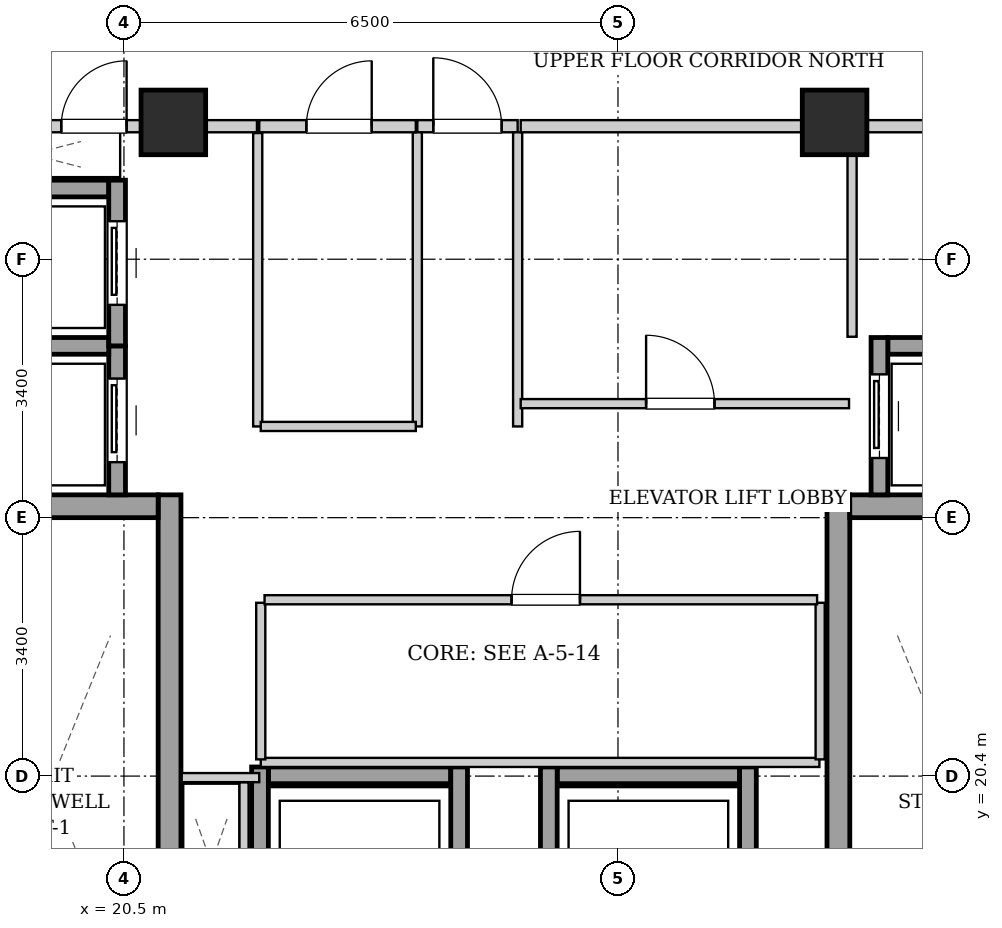
"""IFC4 building model, lengths in metres.
Left out: names, types, materials, properties, quantities, classifications, styles, units other than length and angle.
Written with IfcOpenShell. Run it as: python <this file> out.ifc"""

import sys

from ifc_helpers import new_model, si_unit, direction, frame, frame_2d, origin, origin_2d, place, context, subcontext, project, spatial, rectangle, extrude, element, fill, save


model = new_model("IFC4")
c1 = context("Model", 3, precision=1e-05, world=origin(), true_north=direction((0.0, 1.0)))
c2 = subcontext(c1, "Body", "Model", "MODEL_VIEW")
j1 = project(units=[si_unit("LENGTHUNIT", "METRE"), si_unit("PLANEANGLEUNIT", "RADIAN")], contexts=[c1])
p1 = place(None, origin())
s1 = spatial("IfcSite", under=j1, at=p1, CompositionType="ELEMENT")
p2 = place(p1, origin())
s2 = spatial("IfcBuilding", under=s1, at=p2, CompositionType="ELEMENT")
p3 = place(p2, frame((0.0, 0.0, 204.1)))
s3 = spatial("IfcBuildingStorey", under=s2, at=p3, CompositionType="ELEMENT", Elevation=204.1)
for number, where, z_axis, x_axis in (
    (1, (21.15, 29.0, 0.0), (0.0, 0.0, 1.0), (1.0, 0.0, 0.0)),
    (2, (29.85, 29.0, 0.0), (0.0, 0.0, 1.0), (1.0, 0.0, 0.0)),
):
    element("IfcColumn", number, at=place(p3, frame(where, z_axis=z_axis, x_axis=x_axis)), inside=s3, PredefinedType="COLUMN", context=c2, shape_type="SweptSolid", body=[
        extrude(rectangle(XDim=0.85, YDim=0.85, at=origin_2d()), origin(), (0.0, 0.0, 1.0), 3.3),
    ])
p4 = place(p3, frame((21.1, 15.1, 0.0), z_axis=(0.0, 0.0, 1.0), x_axis=(0.0, 1.0, 0.0)))
e3 = element("IfcWall", 3, at=p4, inside=s3, PredefinedType="SHEAR", context=c2, shape_type="SweptSolid", body=[
    extrude(rectangle(XDim=9.0, YDim=0.3, at=frame_2d((4.5, 0.0))), origin(), (0.0, 0.0, 1.0), 3.04),
])
p5 = place(p3, frame((18.1, 23.95, 0.0), z_axis=(0.0, 0.0, 1.0), x_axis=(1.0, 0.0, 0.0)))
e4 = element("IfcWall", 4, at=p5, inside=s3, PredefinedType="SHEAR", context=c2, shape_type="SweptSolid", body=[
    extrude(rectangle(XDim=2.85, YDim=0.3, at=frame_2d((1.425, 0.0))), origin(), (0.0, 0.0, 1.0), 3.04),
])
p6 = place(p3, frame((29.9, 15.1, 0.0), z_axis=(0.0, 0.0, 1.0), x_axis=(0.0, 1.0, 0.0)))
e5 = element("IfcWall", 5, at=p6, inside=s3, PredefinedType="SHEAR", context=c2, shape_type="SweptSolid", body=[
    extrude(rectangle(XDim=9.0, YDim=0.3, at=frame_2d((4.5, 0.0))), origin(), (0.0, 0.0, 1.0), 3.04),
])
p7 = place(p3, frame((30.05, 23.95, 0.0), z_axis=(0.0, 0.0, 1.0), x_axis=(1.0, 0.0, 0.0)))
e6 = element("IfcWall", 6, at=p7, inside=s3, PredefinedType="SHEAR", context=c2, shape_type="SweptSolid", body=[
    extrude(rectangle(XDim=2.85, YDim=0.3, at=frame_2d((1.425, 0.0))), origin(), (0.0, 0.0, 1.0), 3.04),
])
p8 = place(p3, frame((20.41, 24.1, 0.0), z_axis=(0.0, 0.0, 1.0), x_axis=(0.0, 1.0, 0.0)))
e7 = element("IfcWall", 7, at=p8, inside=s3, PredefinedType="SHEAR", context=c2, shape_type="SweptSolid", body=[
    extrude(rectangle(XDim=1.96, YDim=0.22, at=frame_2d((0.98, 0.0))), origin(), (0.0, 0.0, 1.0), 3.04),
])
p9 = place(p8, frame((0.43, 0.0, 0.0)))
e8 = element("IfcOpeningElement", 8, at=p9, cuts=e7, PredefinedType="OPENING", context=c2, shape_type="SweptSolid", body=[
    extrude(rectangle(XDim=1.1, YDim=2.15, at=frame_2d((0.55, 1.075))), frame((0.0, 0.12, 0.0), z_axis=(0.0, -1.0, 0.0), x_axis=(1.0, 0.0, 0.0)), (0.0, 0.0, 1.0), 0.24),
])
for number, where, z_axis, x_axis in (
    (9, (18.4, 26.06, 0.0), (0.0, 0.0, 1.0), (1.0, 0.0, 0.0)),
    (10, (18.4, 28.13, 0.0), (0.0, 0.0, 1.0), (1.0, 0.0, 0.0)),
):
    element("IfcWall", number, at=place(p3, frame(where, z_axis=z_axis, x_axis=x_axis)), inside=s3, PredefinedType="SHEAR", context=c2, shape_type="SweptSolid", body=[
        extrude(rectangle(XDim=1.9, YDim=0.22, at=frame_2d((0.95, 0.0))), origin(), (0.0, 0.0, 1.0), 3.04),
    ])
p10 = place(p3, frame((20.41, 26.06, 0.0), z_axis=(0.0, 0.0, 1.0), x_axis=(0.0, 1.0, 0.0)))
e11 = element("IfcWall", 11, at=p10, inside=s3, PredefinedType="SHEAR", context=c2, shape_type="SweptSolid", body=[
    extrude(rectangle(XDim=2.18, YDim=0.22, at=frame_2d((1.09, 0.0))), origin(), (0.0, 0.0, 1.0), 3.04),
])
p11 = place(p10, frame((0.54, 0.0, 0.0)))
e12 = element("IfcOpeningElement", 12, at=p11, cuts=e11, PredefinedType="OPENING", context=c2, shape_type="SweptSolid", body=[
    extrude(rectangle(XDim=1.1, YDim=2.15, at=frame_2d((0.55, 1.075))), frame((0.0, 0.12, 0.0), z_axis=(0.0, -1.0, 0.0), x_axis=(1.0, 0.0, 0.0)), (0.0, 0.0, 1.0), 0.24),
])
p12 = place(p3, frame((30.55, 26.06, 0.0), z_axis=(0.0, 0.0, 1.0), x_axis=(1.0, 0.0, 0.0)))
e13 = element("IfcWall", 13, at=p12, inside=s3, PredefinedType="SHEAR", context=c2, shape_type="SweptSolid", body=[
    extrude(rectangle(XDim=1.9, YDim=0.22, at=frame_2d((0.95, 0.0))), origin(), (0.0, 0.0, 1.0), 3.04),
])
p13 = place(p3, frame((30.44, 24.1, 0.0), z_axis=(0.0, 0.0, 1.0), x_axis=(0.0, 1.0, 0.0)))
e14 = element("IfcWall", 14, at=p13, inside=s3, PredefinedType="SHEAR", context=c2, shape_type="SweptSolid", body=[
    extrude(rectangle(XDim=2.07, YDim=0.22, at=frame_2d((1.035, 0.0))), origin(), (0.0, 0.0, 1.0), 3.04),
])
p14 = place(p13, frame((0.485, 0.0, 0.0)))
e15 = element("IfcOpeningElement", 15, at=p14, cuts=e14, PredefinedType="OPENING", context=c2, shape_type="SweptSolid", body=[
    extrude(rectangle(XDim=1.1, YDim=2.15, at=frame_2d((0.55, 1.075))), frame((0.0, 0.12, 0.0), z_axis=(0.0, -1.0, 0.0), x_axis=(1.0, 0.0, 0.0)), (0.0, 0.0, 1.0), 0.24),
])
p15 = place(p3, frame((22.4, 20.41, 0.0), z_axis=(0.0, 0.0, 1.0), x_axis=(1.0, 0.0, 0.0)))
e16 = element("IfcWall", 16, at=p15, inside=s3, PredefinedType="SHEAR", context=c2, shape_type="SweptSolid", body=[
    extrude(rectangle(XDim=2.4, YDim=0.22, at=frame_2d((1.2, 0.0))), origin(), (0.0, 0.0, 1.0), 3.04),
])
for number, where, z_axis, x_axis in (
    (17, (22.29, 17.98, 0.0), (0.0, 0.0, 1.0), (0.0, 1.0, 0.0)),
    (18, (24.91, 17.98, 0.0), (0.0, 0.0, 1.0), (0.0, 1.0, 0.0)),
):
    element("IfcWall", number, at=place(p3, frame(where, z_axis=z_axis, x_axis=x_axis)), inside=s3, PredefinedType="SHEAR", context=c2, shape_type="SweptSolid", body=[
        extrude(rectangle(XDim=2.54, YDim=0.22, at=frame_2d((1.27, 0.0))), origin(), (0.0, 0.0, 1.0), 3.04),
    ])
p16 = place(p3, frame((26.2, 20.41, 0.0), z_axis=(0.0, 0.0, 1.0), x_axis=(1.0, 0.0, 0.0)))
e19 = element("IfcWall", 19, at=p16, inside=s3, PredefinedType="SHEAR", context=c2, shape_type="SweptSolid", body=[
    extrude(rectangle(XDim=2.4, YDim=0.22, at=frame_2d((1.2, 0.0))), origin(), (0.0, 0.0, 1.0), 3.04),
])
for number, where, z_axis, x_axis in (
    (20, (26.09, 17.98, 0.0), (0.0, 0.0, 1.0), (0.0, 1.0, 0.0)),
    (21, (28.71, 17.98, 0.0), (0.0, 0.0, 1.0), (0.0, 1.0, 0.0)),
):
    element("IfcWall", number, at=place(p3, frame(where, z_axis=z_axis, x_axis=x_axis)), inside=s3, PredefinedType="SHEAR", context=c2, shape_type="SweptSolid", body=[
        extrude(rectangle(XDim=2.54, YDim=0.22, at=frame_2d((1.27, 0.0))), origin(), (0.0, 0.0, 1.0), 3.04),
    ])
p17 = place(p3, frame((24.36, 28.95, 0.0), z_axis=(0.0, 0.0, 1.0), x_axis=(1.0, 0.0, 0.0)))
e22 = element("IfcWall", 22, at=p17, inside=s3, PredefinedType="PARTITIONING", context=c2, shape_type="SweptSolid", body=[
    extrude(rectangle(XDim=1.32, YDim=0.16, at=frame_2d((0.66, 0.0))), origin(), (0.0, 0.0, 1.0), 2.556),
])
p18 = place(p17, frame((0.21, 0.0, 0.0)))
e23 = element("IfcOpeningElement", 23, at=p18, cuts=e22, PredefinedType="OPENING", context=c2, shape_type="SweptSolid", body=[
    extrude(rectangle(XDim=0.9, YDim=2.05, at=frame_2d((0.45, 1.025))), frame((0.0, 0.09, 0.0), z_axis=(0.0, -1.0, 0.0), x_axis=(1.0, 0.0, 0.0)), (0.0, 0.0, 1.0), 0.18),
])
p19 = place(p3, frame((17.96, 28.95, 0.0), z_axis=(0.0, 0.0, 1.0), x_axis=(1.0, 0.0, 0.0)))
e24 = element("IfcWall", 24, at=p19, inside=s3, PredefinedType="PARTITIONING", context=c2, shape_type="SweptSolid", body=[
    extrude(rectangle(XDim=4.29, YDim=0.16, at=frame_2d((2.145, 0.0))), origin(), (0.0, 0.0, 1.0), 2.556),
])
p20 = place(p19, frame((1.715, 0.0, 0.0)))
e25 = element("IfcOpeningElement", 25, at=p20, cuts=e24, PredefinedType="OPENING", context=c2, shape_type="SweptSolid", body=[
    extrude(rectangle(XDim=0.86, YDim=2.05, at=frame_2d((0.43, 1.025))), frame((0.0, 0.09, 0.0), z_axis=(0.0, -1.0, 0.0), x_axis=(1.0, 0.0, 0.0)), (0.0, 0.0, 1.0), 0.18),
])
p21 = place(p3, frame((22.08, 18.2, 0.0), z_axis=(0.0, 0.0, 1.0), x_axis=(0.0, 1.0, 0.0)))
e26 = element("IfcWall", 26, at=p21, inside=s3, PredefinedType="PARTITIONING", context=c2, shape_type="SweptSolid", body=[
    extrude(rectangle(XDim=2.12, YDim=0.12, at=frame_2d((1.06, 0.0))), origin(), (0.0, 0.0, 1.0), 3.04),
])
p22 = place(p3, frame((22.28, 20.38, 0.0), z_axis=(0.0, 0.0, 1.0), x_axis=(-1.0, 0.0, 0.0)))
e27 = element("IfcWall", 27, at=p22, inside=s3, PredefinedType="PARTITIONING", context=c2, shape_type="SweptSolid", body=[
    extrude(rectangle(XDim=1.02, YDim=0.12, at=frame_2d((0.51, 0.0))), origin(), (0.0, 0.0, 1.0), 3.04),
])
for number, where, z_axis, x_axis in (
    (28, (24.36, 25.0, 0.0), (0.0, 0.0, 1.0), (0.0, 1.0, 0.0)),
    (29, (25.68, 25.0, 0.0), (0.0, 0.0, 1.0), (0.0, 1.0, 0.0)),
):
    element("IfcWall", number, at=place(p3, frame(where, z_axis=z_axis, x_axis=x_axis)), inside=s3, PredefinedType="PARTITIONING", context=c2, shape_type="SweptSolid", body=[
        extrude(rectangle(XDim=3.87, YDim=0.12, at=frame_2d((1.935, 0.0))), origin(), (0.0, 0.0, 1.0), 3.04),
    ])
p23 = place(p3, frame((30.08, 26.18, 0.0), z_axis=(0.0, 0.0, 1.0), x_axis=(0.0, 1.0, 0.0)))
e30 = element("IfcWall", 30, at=p23, inside=s3, PredefinedType="PARTITIONING", context=c2, shape_type="SweptSolid", body=[
    extrude(rectangle(XDim=2.68, YDim=0.12, at=frame_2d((1.34, 0.0))), origin(), (0.0, 0.0, 1.0), 3.04),
])
p24 = place(p3, frame((30.08, 28.95, 0.0), z_axis=(0.0, 0.0, 1.0), x_axis=(1.0, 0.0, 0.0)))
e31 = element("IfcWall", 31, at=p24, inside=s3, PredefinedType="PARTITIONING", context=c2, shape_type="SweptSolid", body=[
    extrude(rectangle(XDim=2.96, YDim=0.16, at=frame_2d((1.48, 0.0))), origin(), (0.0, 0.0, 1.0), 3.04),
])
p25 = place(p24, frame((1.045, 0.0, 0.0)))
e32 = element("IfcOpeningElement", 32, at=p25, cuts=e31, PredefinedType="OPENING", context=c2, shape_type="SweptSolid", body=[
    extrude(rectangle(XDim=0.86, YDim=2.05, at=frame_2d((0.43, 1.025))), frame((0.0, 0.09, 0.0), z_axis=(0.0, -1.0, 0.0), x_axis=(1.0, 0.0, 0.0)), (0.0, 0.0, 1.0), 0.18),
])
p26 = place(p3, frame((22.26, 25.0, 0.0), z_axis=(0.0, 0.0, 1.0), x_axis=(0.0, 1.0, 0.0)))
e33 = element("IfcWall", 33, at=p26, inside=s3, PredefinedType="PARTITIONING", context=c2, shape_type="SweptSolid", body=[
    extrude(rectangle(XDim=3.86, YDim=0.12, at=frame_2d((1.93, 0.0))), origin(), (0.0, 0.0, 1.0), 3.04),
])
p27 = place(p3, frame((22.3, 25.0, 0.0), z_axis=(0.0, 0.0, 1.0), x_axis=(1.0, 0.0, 0.0)))
e34 = element("IfcWall", 34, at=p27, inside=s3, PredefinedType="PARTITIONING", context=c2, shape_type="SweptSolid", body=[
    extrude(rectangle(XDim=2.04, YDim=0.12, at=frame_2d((1.02, 0.0))), origin(), (0.0, 0.0, 1.0), 3.04),
])
p28 = place(p3, frame((22.28, 28.95, 0.0), z_axis=(0.0, 0.0, 1.0), x_axis=(1.0, 0.0, 0.0)))
e35 = element("IfcWall", 35, at=p28, inside=s3, PredefinedType="PARTITIONING", context=c2, shape_type="SweptSolid", body=[
    extrude(rectangle(XDim=2.06, YDim=0.16, at=frame_2d((1.03, 0.0))), origin(), (0.0, 0.0, 1.0), 2.556),
])
p29 = place(p28, frame((0.62, 0.0, 0.0)))
e36 = element("IfcOpeningElement", 36, at=p29, cuts=e35, PredefinedType="OPENING", context=c2, shape_type="SweptSolid", body=[
    extrude(rectangle(XDim=0.86, YDim=2.05, at=frame_2d((0.43, 1.025))), frame((0.0, 0.09, 0.0), z_axis=(0.0, -1.0, 0.0), x_axis=(1.0, 0.0, 0.0)), (0.0, 0.0, 1.0), 0.18),
])
p30 = place(p3, frame((25.72, 28.95, 0.0), z_axis=(0.0, 0.0, 1.0), x_axis=(1.0, 0.0, 0.0)))
e37 = element("IfcWall", 37, at=p30, inside=s3, PredefinedType="PARTITIONING", context=c2, shape_type="SweptSolid", body=[
    extrude(rectangle(XDim=4.32, YDim=0.16, at=frame_2d((2.16, 0.0))), origin(), (0.0, 0.0, 1.0), 2.556),
])
p31 = place(p3, frame((25.72, 25.3, 0.0), z_axis=(0.0, 0.0, 1.0), x_axis=(1.0, 0.0, 0.0)))
e38 = element("IfcWall", 38, at=p31, inside=s3, PredefinedType="PARTITIONING", context=c2, shape_type="SweptSolid", body=[
    extrude(rectangle(XDim=4.32, YDim=0.12, at=frame_2d((2.16, 0.0))), origin(), (0.0, 0.0, 1.0), 3.04),
])
p32 = place(p31, frame((1.65, 0.0, 0.0)))
e39 = element("IfcOpeningElement", 39, at=p32, cuts=e38, PredefinedType="OPENING", context=c2, shape_type="SweptSolid", body=[
    extrude(rectangle(XDim=0.9, YDim=2.05, at=frame_2d((0.45, 1.025))), frame((0.0, 0.07, 0.0), z_axis=(0.0, -1.0, 0.0), x_axis=(1.0, 0.0, 0.0)), (0.0, 0.0, 1.0), 0.14),
])
p33 = place(p3, frame((22.3, 20.58, 0.0), z_axis=(0.0, 0.0, 1.0), x_axis=(1.0, 0.0, 0.0)))
e40 = element("IfcWall", 40, at=p33, inside=s3, PredefinedType="PARTITIONING", context=c2, shape_type="SweptSolid", body=[
    extrude(rectangle(XDim=7.35, YDim=0.12, at=frame_2d((3.675, 0.0))), origin(), (0.0, 0.0, 1.0), 3.04),
])
for number, where, z_axis, x_axis in (
    (41, (22.3, 20.62, 0.0), (0.0, 0.0, 1.0), (0.0, 1.0, 0.0)),
    (42, (29.66, 20.62, 0.0), (0.0, 0.0, 1.0), (0.0, 1.0, 0.0)),
):
    element("IfcWall", number, at=place(p3, frame(where, z_axis=z_axis, x_axis=x_axis)), inside=s3, PredefinedType="PARTITIONING", context=c2, shape_type="SweptSolid", body=[
        extrude(rectangle(XDim=2.06, YDim=0.12, at=frame_2d((1.03, 0.0))), origin(), (0.0, 0.0, 1.0), 3.04),
    ])
p34 = place(p3, frame((22.35, 22.72, 0.0), z_axis=(0.0, 0.0, 1.0), x_axis=(1.0, 0.0, 0.0)))
e43 = element("IfcWall", 43, at=p34, inside=s3, PredefinedType="PARTITIONING", context=c2, shape_type="SweptSolid", body=[
    extrude(rectangle(XDim=7.27, YDim=0.12, at=frame_2d((3.635, 0.0))), origin(), (0.0, 0.0, 1.0), 3.04),
])
p35 = place(p34, frame((3.25, 0.0, 0.0)))
e44 = element("IfcOpeningElement", 44, at=p35, cuts=e43, PredefinedType="OPENING", context=c2, shape_type="SweptSolid", body=[
    extrude(rectangle(XDim=0.9, YDim=2.05, at=frame_2d((0.45, 1.025))), frame((0.0, 0.07, 0.0), z_axis=(0.0, -1.0, 0.0), x_axis=(1.0, 0.0, 0.0)), (0.0, 0.0, 1.0), 0.14),
])
p36 = place(p9, origin())
e45 = element("IfcDoor", 45, at=p36, inside=s3, OperationType="SLIDING_TO_LEFT", PredefinedType="DOOR", context=c2, shape_type="SweptSolid", body=[
    extrude(rectangle(XDim=1.1, YDim=2.15, at=frame_2d((0.55, 1.075))), frame((0.0, 0.025, 0.0), z_axis=(0.0, -1.0, 0.0), x_axis=(1.0, 0.0, 0.0)), (0.0, 0.0, 1.0), 0.05),
])
fill(e8, e45)
p37 = place(p11, origin())
e46 = element("IfcDoor", 46, at=p37, inside=s3, OperationType="SLIDING_TO_LEFT", PredefinedType="DOOR", context=c2, shape_type="SweptSolid", body=[
    extrude(rectangle(XDim=1.1, YDim=2.15, at=frame_2d((0.55, 1.075))), frame((0.0, 0.025, 0.0), z_axis=(0.0, -1.0, 0.0), x_axis=(1.0, 0.0, 0.0)), (0.0, 0.0, 1.0), 0.05),
])
fill(e12, e46)
p38 = place(p14, origin())
e47 = element("IfcDoor", 47, at=p38, inside=s3, OperationType="SLIDING_TO_LEFT", PredefinedType="DOOR", context=c2, shape_type="SweptSolid", body=[
    extrude(rectangle(XDim=1.1, YDim=2.15, at=frame_2d((0.55, 1.075))), frame((0.0, 0.025, 0.0), z_axis=(0.0, -1.0, 0.0), x_axis=(1.0, 0.0, 0.0)), (0.0, 0.0, 1.0), 0.05),
])
fill(e15, e47)
p39 = place(p18, origin())
e48 = element("IfcDoor", 48, at=p39, inside=s3, OperationType="SINGLE_SWING_LEFT", PredefinedType="DOOR", context=c2, shape_type="SweptSolid", body=[
    extrude(rectangle(XDim=0.9, YDim=2.05, at=frame_2d((0.45, 1.025))), frame((0.0, 0.025, 0.0), z_axis=(0.0, -1.0, 0.0), x_axis=(1.0, 0.0, 0.0)), (0.0, 0.0, 1.0), 0.05),
])
fill(e23, e48)
p40 = place(p20, origin())
e49 = element("IfcDoor", 49, at=p40, inside=s3, OperationType="SINGLE_SWING_RIGHT", PredefinedType="DOOR", context=c2, shape_type="SweptSolid", body=[
    extrude(rectangle(XDim=0.86, YDim=2.05, at=frame_2d((0.43, 1.025))), frame((0.0, 0.025, 0.0), z_axis=(0.0, -1.0, 0.0), x_axis=(1.0, 0.0, 0.0)), (0.0, 0.0, 1.0), 0.05),
])
fill(e25, e49)
p41 = place(p29, origin())
e50 = element("IfcDoor", 50, at=p41, inside=s3, OperationType="SINGLE_SWING_RIGHT", PredefinedType="DOOR", context=c2, shape_type="SweptSolid", body=[
    extrude(rectangle(XDim=0.86, YDim=2.05, at=frame_2d((0.43, 1.025))), frame((0.0, 0.025, 0.0), z_axis=(0.0, -1.0, 0.0), x_axis=(1.0, 0.0, 0.0)), (0.0, 0.0, 1.0), 0.05),
])
fill(e36, e50)
p42 = place(p32, origin())
e51 = element("IfcDoor", 51, at=p42, inside=s3, OperationType="SINGLE_SWING_LEFT", PredefinedType="DOOR", context=c2, shape_type="SweptSolid", body=[
    extrude(rectangle(XDim=0.9, YDim=2.05, at=frame_2d((0.45, 1.025))), frame((0.0, 0.025, 0.0), z_axis=(0.0, -1.0, 0.0), x_axis=(1.0, 0.0, 0.0)), (0.0, 0.0, 1.0), 0.05),
])
fill(e39, e51)
p43 = place(p35, origin())
e52 = element("IfcDoor", 52, at=p43, inside=s3, OperationType="SINGLE_SWING_RIGHT", PredefinedType="DOOR", context=c2, shape_type="SweptSolid", body=[
    extrude(rectangle(XDim=0.9, YDim=2.05, at=frame_2d((0.45, 1.025))), frame((0.0, 0.025, 0.0), z_axis=(0.0, -1.0, 0.0), x_axis=(1.0, 0.0, 0.0)), (0.0, 0.0, 1.0), 0.05),
])
fill(e44, e52)
save(model, sys.argv[1])
